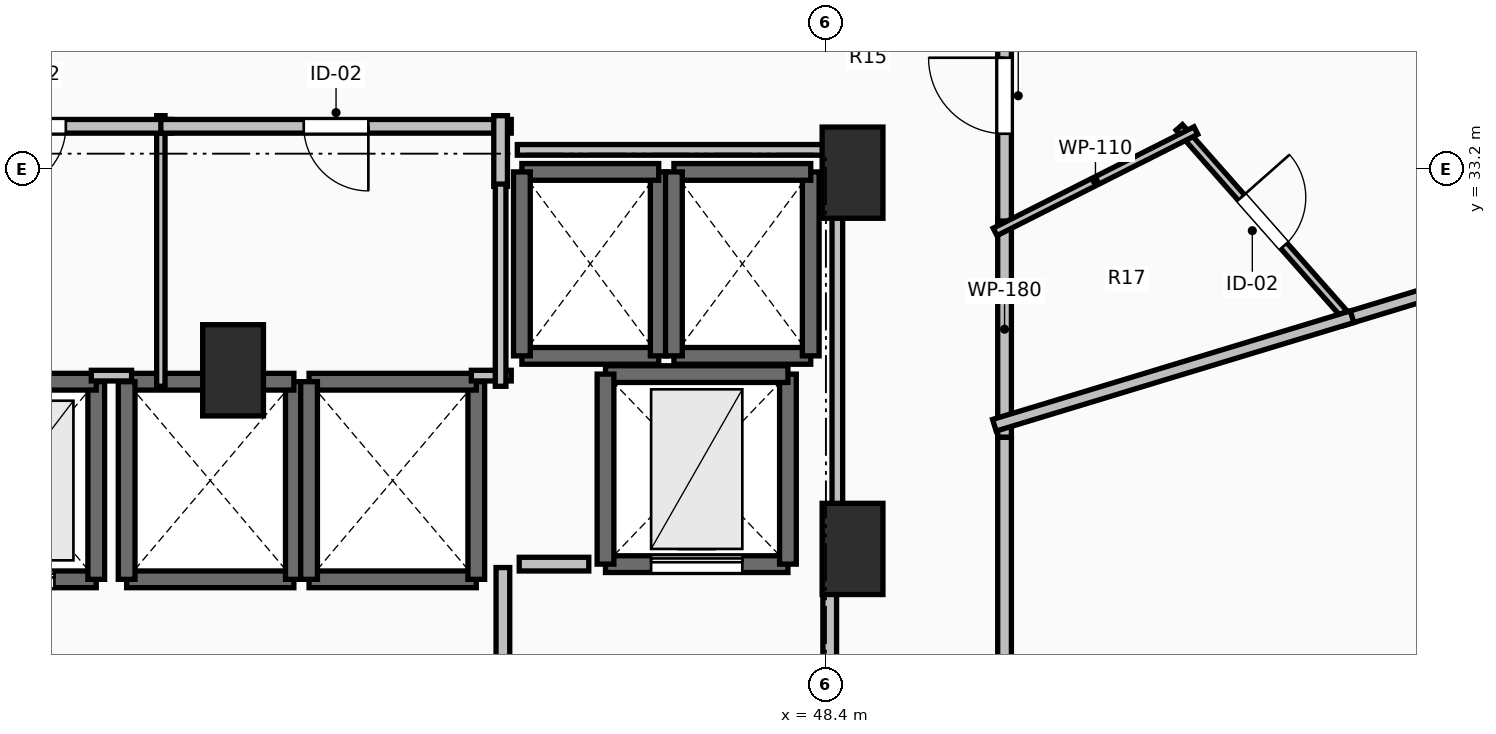
"""IFC4 building model, lengths in metres.
Left out: names, types, materials, properties, quantities, classifications, styles, units other than length and angle.
Written with IfcOpenShell. Run it as: python <this file> out.ifc"""

import sys

from ifc_helpers import new_model, si_unit, direction, frame, frame_2d, origin, origin_2d, place, context, subcontext, project, spatial, rectangle, extrude, element, fill, save


model = new_model("IFC4")
c1 = context("Model", 3, precision=1e-05, world=origin(), true_north=direction((0.0, 1.0)))
c2 = subcontext(c1, "Body", "Model", "MODEL_VIEW")
j1 = project(units=[si_unit("LENGTHUNIT", "METRE"), si_unit("PLANEANGLEUNIT", "RADIAN")], contexts=[c1])
p1 = place(None, origin())
s1 = spatial("IfcSite", under=j1, at=p1, CompositionType="ELEMENT")
p2 = place(p1, origin())
s2 = spatial("IfcBuilding", under=s1, at=p2, CompositionType="ELEMENT")
p3 = place(p2, frame((0.0, 0.0, 110.3)))
s3 = spatial("IfcBuildingStorey", under=s2, at=p3, CompositionType="ELEMENT", Elevation=110.3)
for number, where, z_axis, x_axis in (
    (1, (48.75, 33.15, 0.0), (0.0, 0.0, 1.0), (1.0, 0.0, 0.0)),
    (2, (48.75, 28.2, 0.0), (0.0, 0.0, 1.0), (1.0, 0.0, 0.0)),
    (3, (40.6, 30.55, 0.0), (0.0, 0.0, 1.0), (1.0, 0.0, 0.0)),
):
    element("IfcColumn", number, at=place(p3, frame(where, z_axis=z_axis, x_axis=x_axis)), inside=s3, PredefinedType="PILASTER", context=c2, shape_type="SweptSolid", body=[
        extrude(rectangle(XDim=0.8, YDim=1.2, at=origin_2d()), origin(), (0.0, 0.0, 1.0), 3.5),
    ])
p4 = place(p3, frame((36.6, 27.8, 0.0), z_axis=(0.0, 0.0, 1.0), x_axis=(1.0, 0.0, 0.0)))
e4 = element("IfcWall", 4, at=p4, inside=s3, PredefinedType="SOLIDWALL", context=c2, shape_type="SweptSolid", body=[
    extrude(rectangle(XDim=2.2, YDim=0.22, at=frame_2d((1.1, 0.0))), origin(), (0.0, 0.0, 1.0), 3.24),
])
p5 = place(p4, frame((0.55, 0.0, 0.0)))
e5 = element("IfcOpeningElement", 5, at=p5, cuts=e4, PredefinedType="OPENING", context=c2, shape_type="SweptSolid", body=[
    extrude(rectangle(XDim=1.1, YDim=2.2, at=frame_2d((0.55, 1.1))), frame((0.0, 0.125, 0.0), z_axis=(0.0, -1.0, 0.0), x_axis=(1.0, 0.0, 0.0)), (0.0, 0.0, 1.0), 0.25),
])
p6 = place(p3, frame((38.8, 27.8, 0.0), z_axis=(0.0, 0.0, 1.0), x_axis=(0.0, 1.0, 0.0)))
e6 = element("IfcWall", 6, at=p6, inside=s3, PredefinedType="SOLIDWALL", context=c2, shape_type="SweptSolid", body=[
    extrude(rectangle(XDim=2.6, YDim=0.22, at=frame_2d((1.3, 0.0))), origin(), (0.0, 0.0, 1.0), 3.24),
])
for number, where, z_axis, x_axis in (
    (7, (38.8, 30.4, 0.0), (0.0, 0.0, 1.0), (-1.0, 0.0, 0.0)),
    (8, (39.2, 27.8, 0.0), (0.0, 0.0, 1.0), (1.0, 0.0, 0.0)),
):
    element("IfcWall", number, at=place(p3, frame(where, z_axis=z_axis, x_axis=x_axis)), inside=s3, PredefinedType="SOLIDWALL", context=c2, shape_type="SweptSolid", body=[
        extrude(rectangle(XDim=2.2, YDim=0.22, at=frame_2d((1.1, 0.0))), origin(), (0.0, 0.0, 1.0), 3.24),
    ])
p7 = place(p3, frame((41.4, 27.8, 0.0), z_axis=(0.0, 0.0, 1.0), x_axis=(0.0, 1.0, 0.0)))
e9 = element("IfcWall", 9, at=p7, inside=s3, PredefinedType="SOLIDWALL", context=c2, shape_type="SweptSolid", body=[
    extrude(rectangle(XDim=2.6, YDim=0.22, at=frame_2d((1.3, 0.0))), origin(), (0.0, 0.0, 1.0), 3.24),
])
p8 = place(p3, frame((41.4, 30.4, 0.0), z_axis=(0.0, 0.0, 1.0), x_axis=(-1.0, 0.0, 0.0)))
e10 = element("IfcWall", 10, at=p8, inside=s3, PredefinedType="SOLIDWALL", context=c2, shape_type="SweptSolid", body=[
    extrude(rectangle(XDim=2.2, YDim=0.22, at=frame_2d((1.1, 0.0))), origin(), (0.0, 0.0, 1.0), 3.24),
])
p9 = place(p3, frame((39.2, 30.4, 0.0), z_axis=(0.0, 0.0, 1.0), x_axis=(0.0, -1.0, 0.0)))
e11 = element("IfcWall", 11, at=p9, inside=s3, PredefinedType="SOLIDWALL", context=c2, shape_type="SweptSolid", body=[
    extrude(rectangle(XDim=2.6, YDim=0.22, at=frame_2d((1.3, 0.0))), origin(), (0.0, 0.0, 1.0), 3.24),
])
p10 = place(p3, frame((41.6, 27.8, 0.0), z_axis=(0.0, 0.0, 1.0), x_axis=(1.0, 0.0, 0.0)))
e12 = element("IfcWall", 12, at=p10, inside=s3, PredefinedType="SOLIDWALL", context=c2, shape_type="SweptSolid", body=[
    extrude(rectangle(XDim=2.2, YDim=0.22, at=frame_2d((1.1, 0.0))), origin(), (0.0, 0.0, 1.0), 3.24),
])
p11 = place(p3, frame((43.8, 27.8, 0.0), z_axis=(0.0, 0.0, 1.0), x_axis=(0.0, 1.0, 0.0)))
e13 = element("IfcWall", 13, at=p11, inside=s3, PredefinedType="SOLIDWALL", context=c2, shape_type="SweptSolid", body=[
    extrude(rectangle(XDim=2.6, YDim=0.22, at=frame_2d((1.3, 0.0))), origin(), (0.0, 0.0, 1.0), 3.24),
])
p12 = place(p3, frame((43.8, 30.4, 0.0), z_axis=(0.0, 0.0, 1.0), x_axis=(-1.0, 0.0, 0.0)))
e14 = element("IfcWall", 14, at=p12, inside=s3, PredefinedType="SOLIDWALL", context=c2, shape_type="SweptSolid", body=[
    extrude(rectangle(XDim=2.2, YDim=0.22, at=frame_2d((1.1, 0.0))), origin(), (0.0, 0.0, 1.0), 3.24),
])
p13 = place(p3, frame((41.6, 30.4, 0.0), z_axis=(0.0, 0.0, 1.0), x_axis=(0.0, -1.0, 0.0)))
e15 = element("IfcWall", 15, at=p13, inside=s3, PredefinedType="SOLIDWALL", context=c2, shape_type="SweptSolid", body=[
    extrude(rectangle(XDim=2.6, YDim=0.22, at=frame_2d((1.3, 0.0))), origin(), (0.0, 0.0, 1.0), 3.24),
])
p14 = place(p3, frame((44.4, 30.74, 0.0), z_axis=(0.0, 0.0, 1.0), x_axis=(1.0, 0.0, 0.0)))
e16 = element("IfcWall", 16, at=p14, inside=s3, PredefinedType="SOLIDWALL", context=c2, shape_type="SweptSolid", body=[
    extrude(rectangle(XDim=1.8, YDim=0.22, at=frame_2d((0.9, 0.0))), origin(), (0.0, 0.0, 1.0), 3.24),
])
p15 = place(p3, frame((46.2, 30.74, 0.0), z_axis=(0.0, 0.0, 1.0), x_axis=(0.0, 1.0, 0.0)))
e17 = element("IfcWall", 17, at=p15, inside=s3, PredefinedType="SOLIDWALL", context=c2, shape_type="SweptSolid", body=[
    extrude(rectangle(XDim=2.42, YDim=0.22, at=frame_2d((1.21, 0.0))), origin(), (0.0, 0.0, 1.0), 3.24),
])
p16 = place(p3, frame((46.2, 33.16, 0.0), z_axis=(0.0, 0.0, 1.0), x_axis=(-1.0, 0.0, 0.0)))
e18 = element("IfcWall", 18, at=p16, inside=s3, PredefinedType="SOLIDWALL", context=c2, shape_type="SweptSolid", body=[
    extrude(rectangle(XDim=1.8, YDim=0.22, at=frame_2d((0.9, 0.0))), origin(), (0.0, 0.0, 1.0), 3.24),
])
p17 = place(p3, frame((44.4, 33.16, 0.0), z_axis=(0.0, 0.0, 1.0), x_axis=(0.0, -1.0, 0.0)))
e19 = element("IfcWall", 19, at=p17, inside=s3, PredefinedType="SOLIDWALL", context=c2, shape_type="SweptSolid", body=[
    extrude(rectangle(XDim=2.42, YDim=0.22, at=frame_2d((1.21, 0.0))), origin(), (0.0, 0.0, 1.0), 3.24),
])
p18 = place(p3, frame((46.4, 30.74, 0.0), z_axis=(0.0, 0.0, 1.0), x_axis=(1.0, 0.0, 0.0)))
e20 = element("IfcWall", 20, at=p18, inside=s3, PredefinedType="SOLIDWALL", context=c2, shape_type="SweptSolid", body=[
    extrude(rectangle(XDim=1.8, YDim=0.22, at=frame_2d((0.9, 0.0))), origin(), (0.0, 0.0, 1.0), 3.24),
])
p19 = place(p3, frame((48.2, 30.74, 0.0), z_axis=(0.0, 0.0, 1.0), x_axis=(0.0, 1.0, 0.0)))
e21 = element("IfcWall", 21, at=p19, inside=s3, PredefinedType="SOLIDWALL", context=c2, shape_type="SweptSolid", body=[
    extrude(rectangle(XDim=2.42, YDim=0.22, at=frame_2d((1.21, 0.0))), origin(), (0.0, 0.0, 1.0), 3.24),
])
p20 = place(p3, frame((48.2, 33.16, 0.0), z_axis=(0.0, 0.0, 1.0), x_axis=(-1.0, 0.0, 0.0)))
e22 = element("IfcWall", 22, at=p20, inside=s3, PredefinedType="SOLIDWALL", context=c2, shape_type="SweptSolid", body=[
    extrude(rectangle(XDim=1.8, YDim=0.22, at=frame_2d((0.9, 0.0))), origin(), (0.0, 0.0, 1.0), 3.24),
])
p21 = place(p3, frame((46.4, 33.16, 0.0), z_axis=(0.0, 0.0, 1.0), x_axis=(0.0, -1.0, 0.0)))
e23 = element("IfcWall", 23, at=p21, inside=s3, PredefinedType="SOLIDWALL", context=c2, shape_type="SweptSolid", body=[
    extrude(rectangle(XDim=2.42, YDim=0.22, at=frame_2d((1.21, 0.0))), origin(), (0.0, 0.0, 1.0), 3.24),
])
p22 = place(p3, frame((45.5, 28.0, 0.0), z_axis=(0.0, 0.0, 1.0), x_axis=(1.0, 0.0, 0.0)))
e24 = element("IfcWall", 24, at=p22, inside=s3, PredefinedType="SHEAR", context=c2, shape_type="SweptSolid", body=[
    extrude(rectangle(XDim=2.4, YDim=0.22, at=frame_2d((1.2, 0.0))), origin(), (0.0, 0.0, 1.0), 3.24),
])
p23 = place(p22, frame((0.6, 0.0, 0.0)))
e25 = element("IfcOpeningElement", 25, at=p23, cuts=e24, PredefinedType="OPENING", context=c2, shape_type="SweptSolid", body=[
    extrude(rectangle(XDim=1.2, YDim=2.2, at=frame_2d((0.6, 1.1))), frame((0.0, 0.125, 0.0), z_axis=(0.0, -1.0, 0.0), x_axis=(1.0, 0.0, 0.0)), (0.0, 0.0, 1.0), 0.25),
])
p24 = place(p3, frame((47.9, 28.0, 0.0), z_axis=(0.0, 0.0, 1.0), x_axis=(0.0, 1.0, 0.0)))
e26 = element("IfcWall", 26, at=p24, inside=s3, PredefinedType="SHEAR", context=c2, shape_type="SweptSolid", body=[
    extrude(rectangle(XDim=2.5, YDim=0.22, at=frame_2d((1.25, 0.0))), origin(), (0.0, 0.0, 1.0), 3.24),
])
p25 = place(p3, frame((47.9, 30.5, 0.0), z_axis=(0.0, 0.0, 1.0), x_axis=(-1.0, 0.0, 0.0)))
e27 = element("IfcWall", 27, at=p25, inside=s3, PredefinedType="SHEAR", context=c2, shape_type="SweptSolid", body=[
    extrude(rectangle(XDim=2.4, YDim=0.22, at=frame_2d((1.2, 0.0))), origin(), (0.0, 0.0, 1.0), 3.24),
])
p26 = place(p3, frame((45.5, 30.5, 0.0), z_axis=(0.0, 0.0, 1.0), x_axis=(0.0, -1.0, 0.0)))
e28 = element("IfcWall", 28, at=p26, inside=s3, PredefinedType="SHEAR", context=c2, shape_type="SweptSolid", body=[
    extrude(rectangle(XDim=2.5, YDim=0.22, at=frame_2d((1.25, 0.0))), origin(), (0.0, 0.0, 1.0), 3.24),
])
p27 = place(p3, frame((44.15, 27.955, 0.0), z_axis=(0.0, 0.0, 1.0), x_axis=(0.0, -1.0, 0.0)))
e29 = element("IfcWall", 29, at=p27, inside=s3, PredefinedType="PARTITIONING", context=c2, shape_type="SweptSolid", body=[
    extrude(rectangle(XDim=3.91, YDim=0.18, at=frame_2d((1.955, 0.0))), origin(), (0.0, 0.0, 1.0), 3.24),
])
p28 = place(p27, frame((1.355, 0.0, 0.0)))
e30 = element("IfcOpeningElement", 30, at=p28, cuts=e29, PredefinedType="OPENING", context=c2, shape_type="SweptSolid", body=[
    extrude(rectangle(XDim=1.2, YDim=2.15, at=frame_2d((0.6, 1.075))), frame((0.0, 0.105, 0.0), z_axis=(0.0, -1.0, 0.0), x_axis=(1.0, 0.0, 0.0)), (0.0, 0.0, 1.0), 0.21),
])
p29 = place(p3, frame((48.45, 23.95, 0.0), z_axis=(0.0, 0.0, 1.0), x_axis=(0.0, 1.0, 0.0)))
e31 = element("IfcWall", 31, at=p29, inside=s3, PredefinedType="PARTITIONING", context=c2, shape_type="SweptSolid", body=[
    extrude(rectangle(XDim=4.05, YDim=0.18, at=frame_2d((2.025, 0.0))), origin(), (0.0, 0.0, 1.0), 3.24),
])
p30 = place(p29, frame((1.425, 0.0, 0.0)))
e32 = element("IfcOpeningElement", 32, at=p30, cuts=e31, PredefinedType="OPENING", context=c2, shape_type="SweptSolid", body=[
    extrude(rectangle(XDim=1.2, YDim=2.15, at=frame_2d((0.6, 1.075))), frame((0.0, 0.105, 0.0), z_axis=(0.0, -1.0, 0.0), x_axis=(1.0, 0.0, 0.0)), (0.0, 0.0, 1.0), 0.21),
])
p31 = place(p3, frame((39.65, 30.34, 0.0), z_axis=(0.0, 0.0, 1.0), x_axis=(0.0, 1.0, 0.0)))
e33 = element("IfcWall", 33, at=p31, inside=s3, PredefinedType="PARTITIONING", context=c2, shape_type="SweptSolid", body=[
    extrude(rectangle(XDim=3.56, YDim=0.11, at=frame_2d((1.78, 0.0))), origin(), (0.0, 0.0, 1.0), 2.432),
])
p32 = place(p3, frame((39.79, 33.76, 0.0), z_axis=(0.0, 0.0, 1.0), x_axis=(-1.0, 0.0, 0.0)))
e34 = element("IfcWall", 34, at=p32, inside=s3, PredefinedType="PARTITIONING", context=c2, shape_type="SweptSolid", body=[
    extrude(rectangle(XDim=3.63, YDim=0.18, at=frame_2d((1.815, 0.0))), origin(), (0.0, 0.0, 1.0), 3.24),
])
p33 = place(p32, frame((1.39, 0.0, 0.0)))
e35 = element("IfcOpeningElement", 35, at=p33, cuts=e34, PredefinedType="OPENING", context=c2, shape_type="SweptSolid", body=[
    extrude(rectangle(XDim=0.85, YDim=2.1, at=frame_2d((0.425, 1.05))), frame((0.0, 0.105, 0.0), z_axis=(0.0, -1.0, 0.0), x_axis=(1.0, 0.0, 0.0)), (0.0, 0.0, 1.0), 0.21),
])
p34 = place(p3, frame((44.26, 33.76, 0.0), z_axis=(0.0, 0.0, 1.0), x_axis=(-1.0, 0.0, 0.0)))
e36 = element("IfcWall", 36, at=p34, inside=s3, PredefinedType="PARTITIONING", context=c2, shape_type="SweptSolid", body=[
    extrude(rectangle(XDim=4.61, YDim=0.18, at=frame_2d((2.305, 0.0))), origin(), (0.0, 0.0, 1.0), 3.24),
])
p35 = place(p34, frame((1.88, 0.0, 0.0)))
e37 = element("IfcOpeningElement", 37, at=p35, cuts=e36, PredefinedType="OPENING", context=c2, shape_type="SweptSolid", body=[
    extrude(rectangle(XDim=0.85, YDim=2.1, at=frame_2d((0.425, 1.05))), frame((0.0, 0.105, 0.0), z_axis=(0.0, -1.0, 0.0), x_axis=(1.0, 0.0, 0.0)), (0.0, 0.0, 1.0), 0.21),
])
p36 = place(p3, frame((44.12, 32.97, 0.0), z_axis=(0.0, 0.0, 1.0), x_axis=(0.0, 1.0, 0.0)))
e38 = element("IfcWall", 38, at=p36, inside=s3, PredefinedType="PARTITIONING", context=c2, shape_type="SweptSolid", body=[
    extrude(rectangle(XDim=0.93, YDim=0.18, at=frame_2d((0.465, 0.0))), origin(), (0.0, 0.0, 1.0), 3.24),
])
p37 = place(p3, frame((50.75, 32.374, 0.0), z_axis=(0.0, 0.0, 1.0), x_axis=(0.0, 1.0, 0.0)))
e39 = element("IfcWall", 39, at=p37, inside=s3, PredefinedType="PARTITIONING", context=c2, shape_type="SweptSolid", body=[
    extrude(rectangle(XDim=3.576, YDim=0.18, at=frame_2d((1.788, 0.0))), origin(), (0.0, 0.0, 1.0), 2.432),
])
p38 = place(p37, frame((1.288, 0.0, 0.0)))
e40 = element("IfcOpeningElement", 40, at=p38, cuts=e39, PredefinedType="OPENING", context=c2, shape_type="SweptSolid", body=[
    extrude(rectangle(XDim=1.0, YDim=2.15, at=frame_2d((0.5, 1.075))), frame((0.0, 0.105, 0.0), z_axis=(0.0, -1.0, 0.0), x_axis=(1.0, 0.0, 0.0)), (0.0, 0.0, 1.0), 0.21),
])
p39 = place(p3, frame((50.75, 29.668, 0.0), z_axis=(0.0, 0.0, 1.0), x_axis=(0.0, 1.0, 0.0)))
e41 = element("IfcWall", 41, at=p39, inside=s3, PredefinedType="PARTITIONING", context=c2, shape_type="SweptSolid", body=[
    extrude(rectangle(XDim=2.846, YDim=0.18, at=frame_2d((1.423, 0.0))), origin(), (0.0, 0.0, 1.0), 3.24),
])
p40 = place(p3, frame((50.75, 19.385, 0.0), z_axis=(0.0, 0.0, 1.0), x_axis=(0.0, 1.0, 0.0)))
e42 = element("IfcWall", 42, at=p40, inside=s3, PredefinedType="PARTITIONING", context=c2, shape_type="SweptSolid", body=[
    extrude(rectangle(XDim=10.283, YDim=0.18, at=frame_2d((5.142, 0.0))), origin(), (0.0, 0.0, 1.0), 2.432),
])
p41 = place(p40, frame((4.642, 0.0, 0.0)))
e43 = element("IfcOpeningElement", 43, at=p41, cuts=e42, PredefinedType="OPENING", context=c2, shape_type="SweptSolid", body=[
    extrude(rectangle(XDim=1.0, YDim=2.15, at=frame_2d((0.5, 1.075))), frame((0.0, 0.105, 0.0), z_axis=(0.0, -1.0, 0.0), x_axis=(1.0, 0.0, 0.0)), (0.0, 0.0, 1.0), 0.21),
])
p42 = place(p3, frame((53.049, 33.746, 0.0), z_axis=(0.0, 0.0, 1.0), x_axis=(0.662033979608, -0.749473821988, 0.0)))
e44 = element("IfcWall", 44, at=p42, inside=s3, PredefinedType="PARTITIONING", context=c2, shape_type="SweptSolid", body=[
    extrude(rectangle(XDim=3.309, YDim=0.11, at=frame_2d((1.654, 0.0))), origin(), (0.0, 0.0, 1.0), 2.432),
])
p43 = place(p42, frame((1.229, 0.0, 0.0)))
e45 = element("IfcOpeningElement", 45, at=p43, cuts=e44, PredefinedType="OPENING", context=c2, shape_type="SweptSolid", body=[
    extrude(rectangle(XDim=0.85, YDim=2.1, at=frame_2d((0.425, 1.05))), frame((0.0, 0.07, 0.0), z_axis=(0.0, -1.0, 0.0), x_axis=(1.0, 0.0, 0.0)), (0.0, 0.0, 1.0), 0.14),
])
p44 = place(p3, frame((50.625, 32.371, 0.0), z_axis=(0.0, 0.0, 1.0), x_axis=(0.892771184856, 0.450510389992, 0.0)))
e46 = element("IfcWall", 46, at=p44, inside=s3, PredefinedType="PARTITIONING", context=c2, shape_type="SweptSolid", body=[
    extrude(rectangle(XDim=2.959, YDim=0.11, at=frame_2d((1.48, 0.0))), origin(), (0.0, 0.0, 1.0), 2.432),
])
p45 = place(p3, frame((55.188, 31.214, 0.0), z_axis=(0.0, 0.0, 1.0), x_axis=(0.956927603812, 0.290326645457, 0.0)))
e47 = element("IfcWall", 47, at=p45, inside=s3, PredefinedType="PARTITIONING", context=c2, shape_type="SweptSolid", body=[
    extrude(rectangle(XDim=7.471, YDim=0.16, at=frame_2d((3.735, 0.0))), origin(), (0.0, 0.0, 1.0), 2.886),
])
p46 = place(p3, frame((50.616, 29.827, 0.0), z_axis=(0.0, 0.0, 1.0), x_axis=(0.956958408929, 0.290225091232, 0.0)))
e48 = element("IfcWall", 48, at=p46, inside=s3, PredefinedType="PARTITIONING", context=c2, shape_type="SweptSolid", body=[
    extrude(rectangle(XDim=4.918, YDim=0.16, at=frame_2d((2.459, 0.0))), origin(), (0.0, 0.0, 1.0), 2.929),
])
p47 = place(p3, frame((45.28, 28.0, 0.0), z_axis=(0.0, 0.0, 1.0), x_axis=(-1.0, 0.0, 0.0)))
e49 = element("IfcWall", 49, at=p47, inside=s3, PredefinedType="PARTITIONING", context=c2, shape_type="SweptSolid", body=[
    extrude(rectangle(XDim=0.915, YDim=0.18, at=frame_2d((0.458, 0.0))), origin(), (0.0, 0.0, 1.0), 3.24),
])
p48 = place(p3, frame((38.735, 30.48, 0.0), z_axis=(0.0, 0.0, 1.0), x_axis=(1.0, 0.0, 0.0)))
e50 = element("IfcWall", 50, at=p48, inside=s3, PredefinedType="PARTITIONING", context=c2, shape_type="SweptSolid", body=[
    extrude(rectangle(XDim=0.53, YDim=0.14, at=frame_2d((0.265, 0.0))), origin(), (0.0, 0.0, 1.0), 2.432),
])
p49 = place(p3, frame((43.735, 30.48, 0.0), z_axis=(0.0, 0.0, 1.0), x_axis=(1.0, 0.0, 0.0)))
e51 = element("IfcWall", 51, at=p49, inside=s3, PredefinedType="PARTITIONING", context=c2, shape_type="SweptSolid", body=[
    extrude(rectangle(XDim=0.525, YDim=0.14, at=frame_2d((0.262, 0.0))), origin(), (0.0, 0.0, 1.0), 3.24),
])
p50 = place(p3, frame((44.12, 30.34, 0.0), z_axis=(0.0, 0.0, 1.0), x_axis=(0.0, 1.0, 0.0)))
e52 = element("IfcWall", 52, at=p50, inside=s3, PredefinedType="PARTITIONING", context=c2, shape_type="SweptSolid", body=[
    extrude(rectangle(XDim=2.66, YDim=0.14, at=frame_2d((1.33, 0.0))), origin(), (0.0, 0.0, 1.0), 3.24),
])
p51 = place(p3, frame((44.34, 33.45, 0.0), z_axis=(0.0, 0.0, 1.0), x_axis=(1.0, 0.0, 0.0)))
e53 = element("IfcWall", 53, at=p51, inside=s3, PredefinedType="PARTITIONING", context=c2, shape_type="SweptSolid", body=[
    extrude(rectangle(XDim=4.21, YDim=0.14, at=frame_2d((2.105, 0.0))), origin(), (0.0, 0.0, 1.0), 2.432),
])
p52 = place(p3, frame((48.55, 33.45, 0.0), z_axis=(0.0, 0.0, 1.0), x_axis=(0.0, -1.0, 0.0)))
e54 = element("IfcWall", 54, at=p52, inside=s3, PredefinedType="PARTITIONING", context=c2, shape_type="SweptSolid", body=[
    extrude(rectangle(XDim=5.254, YDim=0.14, at=frame_2d((2.627, 0.0))), origin(), (0.0, 0.0, 1.0), 2.432),
])
p53 = place(p5, origin())
e55 = element("IfcDoor", 55, at=p53, inside=s3, OperationType="SLIDING_TO_LEFT", PredefinedType="DOOR", context=c2, shape_type="SweptSolid", body=[
    extrude(rectangle(XDim=1.1, YDim=2.2, at=frame_2d((0.55, 1.1))), frame((0.0, 0.025, 0.0), z_axis=(0.0, -1.0, 0.0), x_axis=(1.0, 0.0, 0.0)), (0.0, 0.0, 1.0), 0.05),
])
fill(e5, e55)
p54 = place(p23, origin())
e56 = element("IfcDoor", 56, at=p54, inside=s3, OperationType="SLIDING_TO_LEFT", PredefinedType="DOOR", context=c2, shape_type="SweptSolid", body=[
    extrude(rectangle(XDim=1.2, YDim=2.2, at=frame_2d((0.6, 1.1))), frame((0.0, 0.025, 0.0), z_axis=(0.0, -1.0, 0.0), x_axis=(1.0, 0.0, 0.0)), (0.0, 0.0, 1.0), 0.05),
])
fill(e25, e56)
p55 = place(p33, origin())
e57 = element("IfcDoor", 57, at=p55, inside=s3, OperationType="SINGLE_SWING_RIGHT", PredefinedType="DOOR", context=c2, shape_type="SweptSolid", body=[
    extrude(rectangle(XDim=0.85, YDim=2.1, at=frame_2d((0.425, 1.05))), frame((0.0, 0.025, 0.0), z_axis=(0.0, -1.0, 0.0), x_axis=(1.0, 0.0, 0.0)), (0.0, 0.0, 1.0), 0.05),
])
fill(e35, e57)
p56 = place(p35, origin())
e58 = element("IfcDoor", 58, at=p56, inside=s3, OperationType="SINGLE_SWING_LEFT", PredefinedType="DOOR", context=c2, shape_type="SweptSolid", body=[
    extrude(rectangle(XDim=0.85, YDim=2.1, at=frame_2d((0.425, 1.05))), frame((0.0, 0.025, 0.0), z_axis=(0.0, -1.0, 0.0), x_axis=(1.0, 0.0, 0.0)), (0.0, 0.0, 1.0), 0.05),
])
fill(e37, e58)
p57 = place(p38, origin())
e59 = element("IfcDoor", 59, at=p57, inside=s3, OperationType="SINGLE_SWING_RIGHT", PredefinedType="DOOR", context=c2, shape_type="SweptSolid", body=[
    extrude(rectangle(XDim=1.0, YDim=2.15, at=frame_2d((0.5, 1.075))), frame((0.0, 0.025, 0.0), z_axis=(0.0, -1.0, 0.0), x_axis=(1.0, 0.0, 0.0)), (0.0, 0.0, 1.0), 0.05),
])
fill(e40, e59)
p58 = place(p43, origin())
e60 = element("IfcDoor", 60, at=p58, inside=s3, OperationType="SINGLE_SWING_LEFT", PredefinedType="DOOR", context=c2, shape_type="SweptSolid", body=[
    extrude(rectangle(XDim=0.85, YDim=2.1, at=frame_2d((0.425, 1.05))), frame((0.0, 0.025, 0.0), z_axis=(0.0, -1.0, 0.0), x_axis=(1.0, 0.0, 0.0)), (0.0, 0.0, 1.0), 0.05),
])
fill(e45, e60)
save(model, sys.argv[1])
